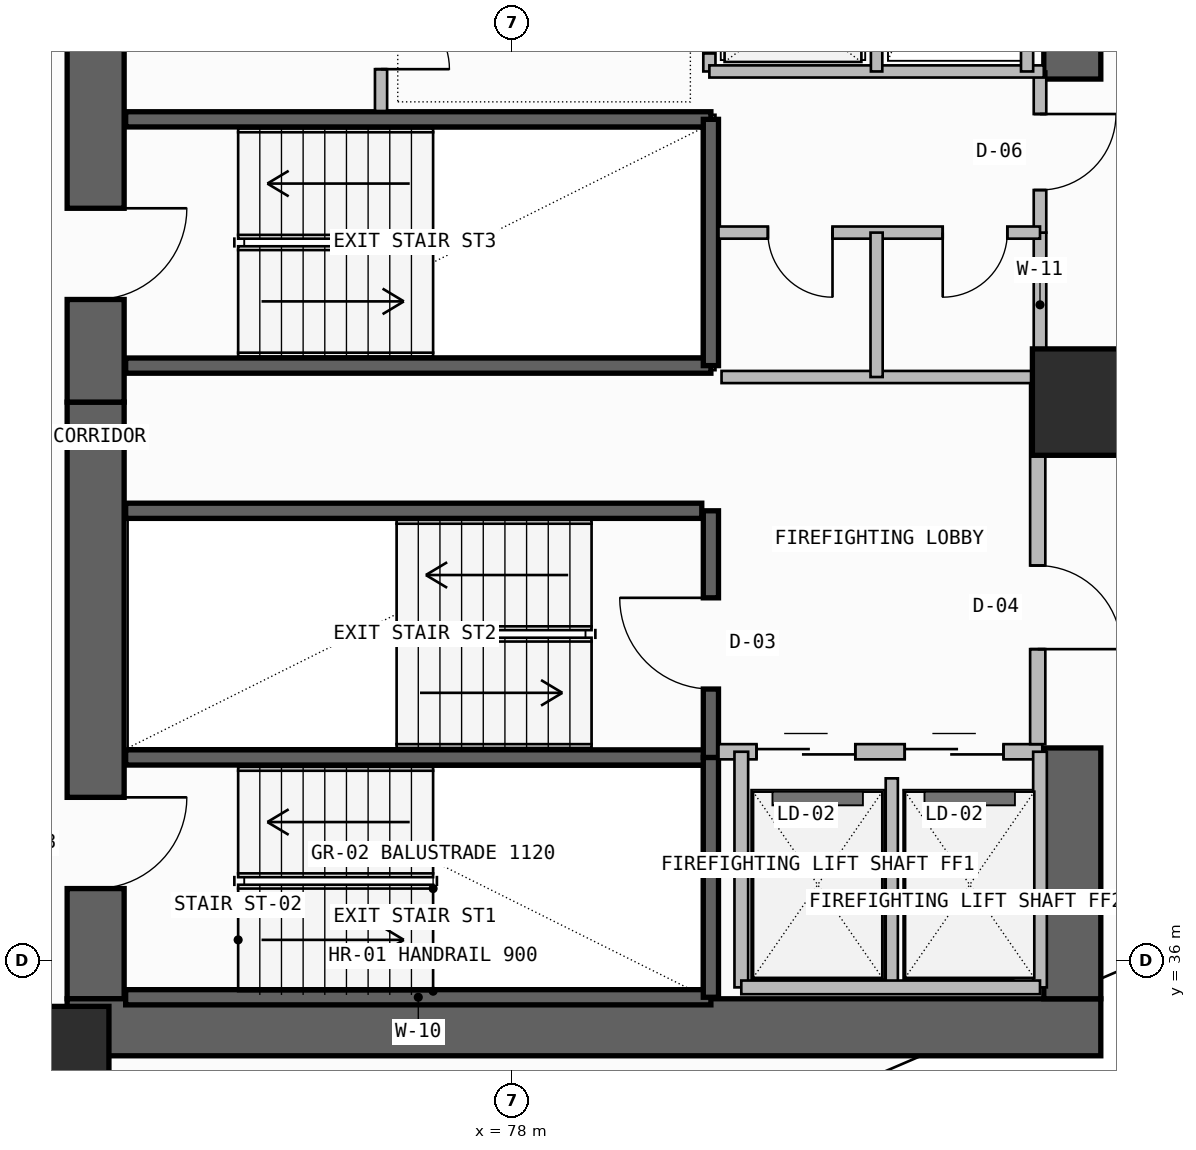
"""IFC4 building model, lengths in metres.
Left out: names, types, materials, properties, quantities, classifications, styles, units other than length and angle.
Written with IfcOpenShell. Run it as: python <this file> out.ifc"""

import sys

from ifc_helpers import new_model, si_unit, direction, frame, frame_2d, origin, origin_2d, place, context, subcontext, project, spatial, rectangle, extrude, element, fill, save


model = new_model("IFC4")
c1 = context("Model", 3, precision=1e-05, world=origin(), true_north=direction((0.0, 1.0)))
c2 = subcontext(c1, "Body", "Model", "MODEL_VIEW")
j1 = project(units=[si_unit("LENGTHUNIT", "METRE"), si_unit("PLANEANGLEUNIT", "RADIAN")], contexts=[c1])
p1 = place(None, origin())
s1 = spatial("IfcSite", under=j1, at=p1, CompositionType="ELEMENT")
p2 = place(p1, origin())
s2 = spatial("IfcBuilding", under=s1, at=p2, CompositionType="ELEMENT")
p3 = place(p2, frame((0.0, 0.0, 186.14)))
s3 = spatial("IfcBuildingStorey", under=s2, at=p3, CompositionType="ELEMENT", Elevation=186.14)
p4 = place(p3, frame((72.525, 35.5, -0.26), z_axis=(0.0, 0.0, 1.0), x_axis=(0.0, 1.0, 0.0)))
e1 = element("IfcWall", 1, at=p4, inside=s3, PredefinedType="SHEAR", context=c2, shape_type="SweptSolid", body=[
    extrude(rectangle(XDim=7.85, YDim=0.75, at=frame_2d((3.925, 0.0))), origin(), (0.0, 0.0, 1.0), 3.52),
])
p5 = place(p4, frame((1.45, 0.0, 0.26)))
e2 = element("IfcOpeningElement", 2, at=p5, cuts=e1, PredefinedType="OPENING", context=c2, shape_type="SweptSolid", body=[
    extrude(rectangle(XDim=1.2, YDim=2.2, at=frame_2d((0.6, 1.1))), frame((0.0, 0.385, 0.0), z_axis=(0.0, -1.0, 0.0), x_axis=(1.0, 0.0, 0.0)), (0.0, 0.0, 1.0), 0.77),
])
p6 = place(p3, frame((72.15, 35.125, -0.26), z_axis=(0.0, 0.0, 1.0), x_axis=(1.0, 0.0, 0.0)))
e3 = element("IfcWall", 3, at=p6, inside=s3, PredefinedType="SHEAR", context=c2, shape_type="SweptSolid", body=[
    extrude(rectangle(XDim=13.6, YDim=0.75, at=frame_2d((6.8, 0.0))), origin(), (0.0, 0.0, 1.0), 3.52),
])
p7 = place(p3, frame((85.375, 35.5, -0.26), z_axis=(0.0, 0.0, 1.0), x_axis=(0.0, 1.0, 0.0)))
e4 = element("IfcWall", 4, at=p7, inside=s3, PredefinedType="SHEAR", context=c2, shape_type="SweptSolid", body=[
    extrude(rectangle(XDim=3.3, YDim=0.75, at=frame_2d((1.65, 0.0))), origin(), (0.0, 0.0, 1.0), 3.52),
])
p8 = place(p3, frame((72.525, 43.35, -0.26), z_axis=(0.0, 0.0, 1.0), x_axis=(0.0, 1.0, 0.0)))
e5 = element("IfcWall", 5, at=p8, inside=s3, PredefinedType="SHEAR", context=c2, shape_type="SweptSolid", body=[
    extrude(rectangle(XDim=12.7, YDim=0.75, at=frame_2d((6.35, 0.0))), origin(), (0.0, 0.0, 1.0), 3.52),
])
p9 = place(p8, frame((1.35, 0.0, 0.26)))
e6 = element("IfcOpeningElement", 6, at=p9, cuts=e5, PredefinedType="OPENING", context=c2, shape_type="SweptSolid", body=[
    extrude(rectangle(XDim=1.2, YDim=2.2, at=frame_2d((0.6, 1.1))), frame((0.0, 0.385, 0.0), z_axis=(0.0, -1.0, 0.0), x_axis=(1.0, 0.0, 0.0)), (0.0, 0.0, 1.0), 0.77),
])
p10 = place(p3, frame((85.375, 47.6, -0.26), z_axis=(0.0, 0.0, 1.0), x_axis=(0.0, 1.0, 0.0)))
e7 = element("IfcWall", 7, at=p10, inside=s3, PredefinedType="SHEAR", context=c2, shape_type="SweptSolid", body=[
    extrude(rectangle(XDim=8.45, YDim=0.75, at=frame_2d((4.225, 0.0))), origin(), (0.0, 0.0, 1.0), 3.52),
])
for number, where, z_axis, x_axis in (
    (8, (72.0, 34.7, 0.0), (0.0, 0.0, 1.0), (1.0, 0.0, 0.0)),
    (9, (85.55, 43.35, 0.0), (0.0, 0.0, 1.0), (1.0, 0.0, 0.0)),
):
    element("IfcColumn", number, at=place(p3, frame(where, z_axis=z_axis, x_axis=x_axis)), inside=s3, PredefinedType="COLUMN", context=c2, shape_type="SweptSolid", body=[
        extrude(rectangle(XDim=1.4, YDim=1.4, at=origin_2d()), origin(), (0.0, 0.0, 1.0), 3.52),
    ])
for number, where, z_axis, x_axis in (
    (10, (72.92, 35.52, -0.26), (0.0, 0.0, 1.0), (1.0, 0.0, 0.0)),
    (11, (72.92, 38.675, -0.26), (0.0, 0.0, 1.0), (1.0, 0.0, 0.0)),
):
    element("IfcWall", number, at=place(p3, frame(where, z_axis=z_axis, x_axis=x_axis)), inside=s3, PredefinedType="SOLIDWALL", context=c2, shape_type="SweptSolid", body=[
        extrude(rectangle(XDim=7.7, YDim=0.2, at=frame_2d((3.85, 0.0))), origin(), (0.0, 0.0, 1.0), 3.52),
    ])
p11 = place(p3, frame((80.62, 35.52, -0.26), z_axis=(0.0, 0.0, 1.0), x_axis=(0.0, 1.0, 0.0)))
e12 = element("IfcWall", 12, at=p11, inside=s3, PredefinedType="SOLIDWALL", context=c2, shape_type="SweptSolid", body=[
    extrude(rectangle(XDim=3.155, YDim=0.2, at=frame_2d((1.578, 0.0))), origin(), (0.0, 0.0, 1.0), 3.52),
])
p12 = place(p3, frame((80.62, 38.675, -0.26), z_axis=(0.0, 0.0, 1.0), x_axis=(0.0, 1.0, 0.0)))
e13 = element("IfcWall", 13, at=p12, inside=s3, PredefinedType="SOLIDWALL", context=c2, shape_type="SweptSolid", body=[
    extrude(rectangle(XDim=3.245, YDim=0.2, at=frame_2d((1.623, 0.0))), origin(), (0.0, 0.0, 1.0), 3.52),
])
p13 = place(p12, frame((0.9, 0.0, 0.26)))
e14 = element("IfcOpeningElement", 14, at=p13, cuts=e13, PredefinedType="OPENING", context=c2, shape_type="SweptSolid", body=[
    extrude(rectangle(XDim=1.2, YDim=2.2, at=frame_2d((0.6, 1.1))), frame((0.0, 0.11, 0.0), z_axis=(0.0, -1.0, 0.0), x_axis=(1.0, 0.0, 0.0)), (0.0, 0.0, 1.0), 0.22),
])
p14 = place(p3, frame((80.72, 38.75, 0.0), z_axis=(0.0, 0.0, 1.0), x_axis=(1.0, 0.0, 0.0)))
e15 = element("IfcWall", 15, at=p14, inside=s3, PredefinedType="SOLIDWALL", context=c2, shape_type="SweptSolid", body=[
    extrude(rectangle(XDim=4.26, YDim=0.2, at=frame_2d((2.13, 0.0))), origin(), (0.0, 0.0, 1.0), 3.26),
])
p15 = place(p14, frame((0.5, 0.0, 0.0)))
e16 = element("IfcOpeningElement", 16, at=p15, cuts=e15, PredefinedType="OPENING", context=c2, shape_type="SweptSolid", body=[
    extrude(rectangle(XDim=1.3, YDim=2.3, at=frame_2d((0.65, 1.15))), frame((0.0, 0.11, 0.0), z_axis=(0.0, -1.0, 0.0), x_axis=(1.0, 0.0, 0.0)), (0.0, 0.0, 1.0), 0.22),
])
p16 = place(p14, frame((2.45, 0.0, 0.0)))
e17 = element("IfcOpeningElement", 17, at=p16, cuts=e15, PredefinedType="OPENING", context=c2, shape_type="SweptSolid", body=[
    extrude(rectangle(XDim=1.3, YDim=2.3, at=frame_2d((0.65, 1.15))), frame((0.0, 0.11, 0.0), z_axis=(0.0, -1.0, 0.0), x_axis=(1.0, 0.0, 0.0)), (0.0, 0.0, 1.0), 0.22),
])
p17 = place(p3, frame((83.0, 35.65, 0.0), z_axis=(0.0, 0.0, 1.0), x_axis=(0.0, 1.0, 0.0)))
e18 = element("IfcWall", 18, at=p17, inside=s3, PredefinedType="PLUMBINGWALL", context=c2, shape_type="SweptSolid", body=[
    extrude(rectangle(XDim=2.75, YDim=0.16, at=frame_2d((1.375, 0.0))), origin(), (0.0, 0.0, 1.0), 3.26),
])
for number, where, z_axis, x_axis in (
    (19, (84.95, 35.65, 0.0), (0.0, 0.0, 1.0), (0.0, 1.0, 0.0)),
    (20, (81.02, 35.65, 0.0), (0.0, 0.0, 1.0), (0.0, 1.0, 0.0)),
):
    element("IfcWall", number, at=place(p3, frame(where, z_axis=z_axis, x_axis=x_axis)), inside=s3, PredefinedType="SOLIDWALL", context=c2, shape_type="SweptSolid", body=[
        extrude(rectangle(XDim=3.1, YDim=0.18, at=frame_2d((1.55, 0.0))), origin(), (0.0, 0.0, 1.0), 3.26),
    ])
p18 = place(p3, frame((81.02, 35.65, 0.0), z_axis=(0.0, 0.0, 1.0), x_axis=(1.0, 0.0, 0.0)))
e21 = element("IfcWall", 21, at=p18, inside=s3, PredefinedType="SOLIDWALL", context=c2, shape_type="SweptSolid", body=[
    extrude(rectangle(XDim=3.93, YDim=0.18, at=frame_2d((1.965, 0.0))), origin(), (0.0, 0.0, 1.0), 3.26),
])
p19 = place(p3, frame((84.92, 38.85, 0.0), z_axis=(0.0, 0.0, 1.0), x_axis=(0.0, 1.0, 0.0)))
e22 = element("IfcWall", 22, at=p19, inside=s3, PredefinedType="SOLIDWALL", context=c2, shape_type="SweptSolid", body=[
    extrude(rectangle(XDim=4.83, YDim=0.2, at=frame_2d((2.415, 0.0))), origin(), (0.0, 0.0, 1.0), 3.26),
])
p20 = place(p19, frame((1.25, 0.0, 0.0)))
e23 = element("IfcOpeningElement", 23, at=p20, cuts=e22, PredefinedType="OPENING", context=c2, shape_type="SweptSolid", body=[
    extrude(rectangle(XDim=1.1, YDim=2.2, at=frame_2d((0.55, 1.1))), frame((0.0, 0.11, 0.0), z_axis=(0.0, -1.0, 0.0), x_axis=(1.0, 0.0, 0.0)), (0.0, 0.0, 1.0), 0.22),
])
p21 = place(p3, frame((72.92, 41.92, -0.26), z_axis=(0.0, 0.0, 1.0), x_axis=(1.0, 0.0, 0.0)))
e24 = element("IfcWall", 24, at=p21, inside=s3, PredefinedType="SOLIDWALL", context=c2, shape_type="SweptSolid", body=[
    extrude(rectangle(XDim=7.58, YDim=0.2, at=frame_2d((3.79, 0.0))), origin(), (0.0, 0.0, 1.0), 3.52),
])
for number, where, z_axis, x_axis in (
    (25, (72.92, 43.83, -0.26), (0.0, 0.0, 1.0), (1.0, 0.0, 0.0)),
    (26, (72.92, 47.07, -0.26), (0.0, 0.0, 1.0), (1.0, 0.0, 0.0)),
):
    element("IfcWall", number, at=place(p3, frame(where, z_axis=z_axis, x_axis=x_axis)), inside=s3, PredefinedType="SOLIDWALL", context=c2, shape_type="SweptSolid", body=[
        extrude(rectangle(XDim=7.7, YDim=0.2, at=frame_2d((3.85, 0.0))), origin(), (0.0, 0.0, 1.0), 3.52),
    ])
p22 = place(p3, frame((80.62, 43.83, -0.26), z_axis=(0.0, 0.0, 1.0), x_axis=(0.0, 1.0, 0.0)))
e27 = element("IfcWall", 27, at=p22, inside=s3, PredefinedType="SOLIDWALL", context=c2, shape_type="SweptSolid", body=[
    extrude(rectangle(XDim=3.24, YDim=0.2, at=frame_2d((1.62, 0.0))), origin(), (0.0, 0.0, 1.0), 3.52),
])
p23 = place(p3, frame((84.95, 43.68, 0.0), z_axis=(0.0, 0.0, 1.0), x_axis=(0.0, 1.0, 0.0)))
e28 = element("IfcWall", 28, at=p23, inside=s3, PredefinedType="PLUMBINGWALL", context=c2, shape_type="SweptSolid", body=[
    extrude(rectangle(XDim=1.9, YDim=0.165, at=frame_2d((0.95, 0.0))), origin(), (0.0, 0.0, 1.0), 3.26),
])
p24 = place(p3, frame((84.95, 45.58, 0.0), z_axis=(0.0, 0.0, 1.0), x_axis=(0.0, 1.0, 0.0)))
e29 = element("IfcWall", 29, at=p24, inside=s3, PredefinedType="PARTITIONING", context=c2, shape_type="SweptSolid", body=[
    extrude(rectangle(XDim=2.12, YDim=0.165, at=frame_2d((1.06, 0.0))), origin(), (0.0, 0.0, 1.0), 3.26),
])
p25 = place(p24, frame((0.56, 0.0, 0.0)))
e30 = element("IfcOpeningElement", 30, at=p25, cuts=e29, PredefinedType="OPENING", context=c2, shape_type="SweptSolid", body=[
    extrude(rectangle(XDim=1.0, YDim=2.2, at=frame_2d((0.5, 1.1))), frame((0.0, 0.093, 0.0), z_axis=(0.0, -1.0, 0.0), x_axis=(1.0, 0.0, 0.0)), (0.0, 0.0, 1.0), 0.185),
])
p26 = place(p3, frame((80.72, 45.58, 0.0), z_axis=(0.0, 0.0, 1.0), x_axis=(1.0, 0.0, 0.0)))
e31 = element("IfcWall", 31, at=p26, inside=s3, PredefinedType="PLUMBINGWALL", context=c2, shape_type="SweptSolid", body=[
    extrude(rectangle(XDim=4.23, YDim=0.16, at=frame_2d((2.115, 0.0))), origin(), (0.0, 0.0, 1.0), 3.26),
])
p27 = place(p26, frame((0.65, 0.0, 0.0)))
e32 = element("IfcOpeningElement", 32, at=p27, cuts=e31, PredefinedType="OPENING", context=c2, shape_type="SweptSolid", body=[
    extrude(rectangle(XDim=0.85, YDim=2.05, at=frame_2d((0.425, 1.025))), frame((0.0, 0.09, 0.0), z_axis=(0.0, -1.0, 0.0), x_axis=(1.0, 0.0, 0.0)), (0.0, 0.0, 1.0), 0.18),
])
p28 = place(p26, frame((2.95, 0.0, 0.0)))
e33 = element("IfcOpeningElement", 33, at=p28, cuts=e31, PredefinedType="OPENING", context=c2, shape_type="SweptSolid", body=[
    extrude(rectangle(XDim=0.85, YDim=2.05, at=frame_2d((0.425, 1.025))), frame((0.0, 0.09, 0.0), z_axis=(0.0, -1.0, 0.0), x_axis=(1.0, 0.0, 0.0)), (0.0, 0.0, 1.0), 0.18),
])
p29 = place(p3, frame((80.76, 43.68, 0.0), z_axis=(0.0, 0.0, 1.0), x_axis=(1.0, 0.0, 0.0)))
e34 = element("IfcWall", 34, at=p29, inside=s3, PredefinedType="PLUMBINGWALL", context=c2, shape_type="SweptSolid", body=[
    extrude(rectangle(XDim=4.19, YDim=0.16, at=frame_2d((2.095, 0.0))), origin(), (0.0, 0.0, 1.0), 3.26),
])
p30 = place(p3, frame((82.8, 43.68, 0.0), z_axis=(0.0, 0.0, 1.0), x_axis=(0.0, 1.0, 0.0)))
e35 = element("IfcWall", 35, at=p30, inside=s3, PredefinedType="PLUMBINGWALL", context=c2, shape_type="SweptSolid", body=[
    extrude(rectangle(XDim=1.9, YDim=0.16, at=frame_2d((0.95, 0.0))), origin(), (0.0, 0.0, 1.0), 3.26),
])
p31 = place(p3, frame((76.28, 47.18, 0.0), z_axis=(0.0, 0.0, 1.0), x_axis=(0.0, 1.0, 0.0)))
e36 = element("IfcWall", 36, at=p31, inside=s3, PredefinedType="SOLIDWALL", context=c2, shape_type="SweptSolid", body=[
    extrude(rectangle(XDim=5.14, YDim=0.16, at=frame_2d((2.57, 0.0))), origin(), (0.0, 0.0, 1.0), 3.26),
])
p32 = place(p31, frame((0.55, 0.0, 0.0)))
e37 = element("IfcOpeningElement", 37, at=p32, cuts=e36, PredefinedType="OPENING", context=c2, shape_type="SweptSolid", body=[
    extrude(rectangle(XDim=0.9, YDim=2.1, at=frame_2d((0.45, 1.05))), frame((0.0, 0.09, 0.0), z_axis=(0.0, -1.0, 0.0), x_axis=(1.0, 0.0, 0.0)), (0.0, 0.0, 1.0), 0.18),
])
p33 = place(p31, frame((2.95, 0.0, 0.0)))
e38 = element("IfcOpeningElement", 38, at=p33, cuts=e36, PredefinedType="OPENING", context=c2, shape_type="SweptSolid", body=[
    extrude(rectangle(XDim=1.0, YDim=2.2, at=frame_2d((0.5, 1.1))), frame((0.0, 0.09, 0.0), z_axis=(0.0, -1.0, 0.0), x_axis=(1.0, 0.0, 0.0)), (0.0, 0.0, 1.0), 0.18),
])
p34 = place(p3, frame((80.6, 47.7, 0.0), z_axis=(0.0, 0.0, 1.0), x_axis=(0.0, 1.0, 0.0)))
e39 = element("IfcWall", 39, at=p34, inside=s3, PredefinedType="SOLIDWALL", context=c2, shape_type="SweptSolid", body=[
    extrude(rectangle(XDim=4.6, YDim=0.16, at=frame_2d((2.3, 0.0))), origin(), (0.0, 0.0, 1.0), 3.26),
])
p35 = place(p34, frame((0.24, 0.0, 0.0)))
e40 = element("IfcOpeningElement", 40, at=p35, cuts=e39, PredefinedType="OPENING", context=c2, shape_type="SweptSolid", body=[
    extrude(rectangle(XDim=1.1, YDim=2.25, at=frame_2d((0.55, 1.125))), frame((0.0, 0.09, 0.0), z_axis=(0.0, -1.0, 0.0), x_axis=(1.0, 0.0, 0.0)), (0.0, 0.0, 1.0), 0.18),
])
p36 = place(p34, frame((1.76, 0.0, 0.0)))
e41 = element("IfcOpeningElement", 41, at=p36, cuts=e39, PredefinedType="OPENING", context=c2, shape_type="SweptSolid", body=[
    extrude(rectangle(XDim=1.1, YDim=2.25, at=frame_2d((0.55, 1.125))), frame((0.0, 0.09, 0.0), z_axis=(0.0, -1.0, 0.0), x_axis=(1.0, 0.0, 0.0)), (0.0, 0.0, 1.0), 0.18),
])
p37 = place(p34, frame((3.28, 0.0, 0.0)))
e42 = element("IfcOpeningElement", 42, at=p37, cuts=e39, PredefinedType="OPENING", context=c2, shape_type="SweptSolid", body=[
    extrude(rectangle(XDim=1.1, YDim=2.25, at=frame_2d((0.55, 1.125))), frame((0.0, 0.09, 0.0), z_axis=(0.0, -1.0, 0.0), x_axis=(1.0, 0.0, 0.0)), (0.0, 0.0, 1.0), 0.18),
])
p38 = place(p3, frame((80.6, 47.7, 0.0), z_axis=(0.0, 0.0, 1.0), x_axis=(1.0, 0.0, 0.0)))
e43 = element("IfcWall", 43, at=p38, inside=s3, PredefinedType="SOLIDWALL", context=c2, shape_type="SweptSolid", body=[
    extrude(rectangle(XDim=4.4, YDim=0.16, at=frame_2d((2.2, 0.0))), origin(), (0.0, 0.0, 1.0), 3.26),
])
p39 = place(p3, frame((82.8, 47.7, 0.0), z_axis=(0.0, 0.0, 1.0), x_axis=(0.0, 1.0, 0.0)))
e44 = element("IfcWall", 44, at=p39, inside=s3, PredefinedType="PLUMBINGWALL", context=c2, shape_type="SweptSolid", body=[
    extrude(rectangle(XDim=4.6, YDim=0.15, at=frame_2d((2.3, 0.0))), origin(), (0.0, 0.0, 1.0), 3.26),
])
p40 = place(p3, frame((84.78, 47.7, 0.0), z_axis=(0.0, 0.0, 1.0), x_axis=(0.0, 1.0, 0.0)))
e45 = element("IfcWall", 45, at=p40, inside=s3, PredefinedType="SOLIDWALL", context=c2, shape_type="SweptSolid", body=[
    extrude(rectangle(XDim=4.6, YDim=0.16, at=frame_2d((2.3, 0.0))), origin(), (0.0, 0.0, 1.0), 3.26),
])
p41 = place(p5, frame((1.2, 0.0, 0.0), z_axis=(0.0, 0.0, 1.0), x_axis=(-1.0, 0.0, 0.0)))
e46 = element("IfcDoor", 46, at=p41, inside=s3, OperationType="SINGLE_SWING_LEFT", PredefinedType="USERDEFINED", context=c2, shape_type="SweptSolid", body=[
    extrude(rectangle(XDim=1.2, YDim=2.2, at=frame_2d((0.6, 1.1))), frame((0.0, 0.025, 0.0), z_axis=(0.0, -1.0, 0.0), x_axis=(1.0, 0.0, 0.0)), (0.0, 0.0, 1.0), 0.05),
])
fill(e2, e46)
p42 = place(p13, origin())
e47 = element("IfcDoor", 47, at=p42, inside=s3, OperationType="SINGLE_SWING_RIGHT", PredefinedType="USERDEFINED", context=c2, shape_type="SweptSolid", body=[
    extrude(rectangle(XDim=1.2, YDim=2.2, at=frame_2d((0.6, 1.1))), frame((0.0, 0.025, 0.0), z_axis=(0.0, -1.0, 0.0), x_axis=(1.0, 0.0, 0.0)), (0.0, 0.0, 1.0), 0.05),
])
fill(e14, e47)
p43 = place(p15, origin())
e48 = element("IfcDoor", 48, at=p43, inside=s3, OperationType="DOUBLE_DOOR_SLIDING", PredefinedType="DOOR", context=c2, shape_type="SweptSolid", body=[
    extrude(rectangle(XDim=1.3, YDim=2.3, at=frame_2d((0.65, 1.15))), frame((0.0, 0.025, 0.0), z_axis=(0.0, -1.0, 0.0), x_axis=(1.0, 0.0, 0.0)), (0.0, 0.0, 1.0), 0.05),
])
fill(e16, e48)
p44 = place(p16, origin())
e49 = element("IfcDoor", 49, at=p44, inside=s3, OperationType="DOUBLE_DOOR_SLIDING", PredefinedType="DOOR", context=c2, shape_type="SweptSolid", body=[
    extrude(rectangle(XDim=1.3, YDim=2.3, at=frame_2d((0.65, 1.15))), frame((0.0, 0.025, 0.0), z_axis=(0.0, -1.0, 0.0), x_axis=(1.0, 0.0, 0.0)), (0.0, 0.0, 1.0), 0.05),
])
fill(e17, e49)
p45 = place(p20, frame((1.1, 0.0, 0.0), z_axis=(0.0, 0.0, 1.0), x_axis=(-1.0, 0.0, 0.0)))
e50 = element("IfcDoor", 50, at=p45, inside=s3, OperationType="SINGLE_SWING_RIGHT", PredefinedType="DOOR", context=c2, shape_type="SweptSolid", body=[
    extrude(rectangle(XDim=1.1, YDim=2.2, at=frame_2d((0.55, 1.1))), frame((0.0, 0.025, 0.0), z_axis=(0.0, -1.0, 0.0), x_axis=(1.0, 0.0, 0.0)), (0.0, 0.0, 1.0), 0.05),
])
fill(e23, e50)
p46 = place(p9, frame((1.2, 0.0, 0.0), z_axis=(0.0, 0.0, 1.0), x_axis=(-1.0, 0.0, 0.0)))
e51 = element("IfcDoor", 51, at=p46, inside=s3, OperationType="SINGLE_SWING_LEFT", PredefinedType="USERDEFINED", context=c2, shape_type="SweptSolid", body=[
    extrude(rectangle(XDim=1.2, YDim=2.2, at=frame_2d((0.6, 1.1))), frame((0.0, 0.025, 0.0), z_axis=(0.0, -1.0, 0.0), x_axis=(1.0, 0.0, 0.0)), (0.0, 0.0, 1.0), 0.05),
])
fill(e6, e51)
p47 = place(p25, frame((1.0, 0.0, 0.0), z_axis=(0.0, 0.0, 1.0), x_axis=(-1.0, 0.0, 0.0)))
e52 = element("IfcDoor", 52, at=p47, inside=s3, OperationType="SINGLE_SWING_LEFT", PredefinedType="DOOR", context=c2, shape_type="SweptSolid", body=[
    extrude(rectangle(XDim=1.0, YDim=2.2, at=frame_2d((0.5, 1.1))), frame((0.0, 0.025, 0.0), z_axis=(0.0, -1.0, 0.0), x_axis=(1.0, 0.0, 0.0)), (0.0, 0.0, 1.0), 0.05),
])
fill(e30, e52)
p48 = place(p27, frame((0.85, 0.0, 0.0), z_axis=(0.0, 0.0, 1.0), x_axis=(-1.0, 0.0, 0.0)))
e53 = element("IfcDoor", 53, at=p48, inside=s3, OperationType="SINGLE_SWING_LEFT", PredefinedType="DOOR", context=c2, shape_type="SweptSolid", body=[
    extrude(rectangle(XDim=0.85, YDim=2.05, at=frame_2d((0.425, 1.025))), frame((0.0, 0.025, 0.0), z_axis=(0.0, -1.0, 0.0), x_axis=(1.0, 0.0, 0.0)), (0.0, 0.0, 1.0), 0.05),
])
fill(e32, e53)
p49 = place(p28, frame((0.85, 0.0, 0.0), z_axis=(0.0, 0.0, 1.0), x_axis=(-1.0, 0.0, 0.0)))
e54 = element("IfcDoor", 54, at=p49, inside=s3, OperationType="SINGLE_SWING_RIGHT", PredefinedType="DOOR", context=c2, shape_type="SweptSolid", body=[
    extrude(rectangle(XDim=0.85, YDim=2.05, at=frame_2d((0.425, 1.025))), frame((0.0, 0.025, 0.0), z_axis=(0.0, -1.0, 0.0), x_axis=(1.0, 0.0, 0.0)), (0.0, 0.0, 1.0), 0.05),
])
fill(e33, e54)
p50 = place(p32, frame((0.9, 0.0, 0.0), z_axis=(0.0, 0.0, 1.0), x_axis=(-1.0, 0.0, 0.0)))
e55 = element("IfcDoor", 55, at=p50, inside=s3, OperationType="SINGLE_SWING_RIGHT", PredefinedType="DOOR", context=c2, shape_type="SweptSolid", body=[
    extrude(rectangle(XDim=0.9, YDim=2.1, at=frame_2d((0.45, 1.05))), frame((0.0, 0.025, 0.0), z_axis=(0.0, -1.0, 0.0), x_axis=(1.0, 0.0, 0.0)), (0.0, 0.0, 1.0), 0.05),
])
fill(e37, e55)
p51 = place(p35, frame((1.1, 0.0, 0.0), z_axis=(0.0, 0.0, 1.0), x_axis=(-1.0, 0.0, 0.0)))
e56 = element("IfcDoor", 56, at=p51, inside=s3, OperationType="DOUBLE_DOOR_SLIDING", PredefinedType="DOOR", context=c2, shape_type="SweptSolid", body=[
    extrude(rectangle(XDim=1.1, YDim=2.25, at=frame_2d((0.55, 1.125))), frame((0.0, 0.025, 0.0), z_axis=(0.0, -1.0, 0.0), x_axis=(1.0, 0.0, 0.0)), (0.0, 0.0, 1.0), 0.05),
])
fill(e40, e56)
save(model, sys.argv[1])
